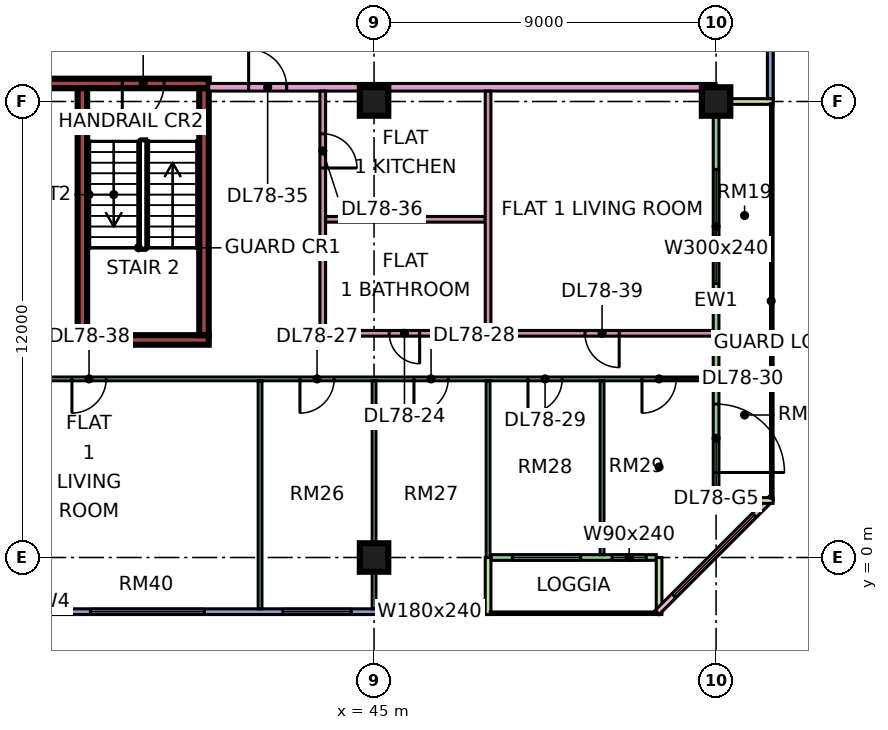
"""IFC4 building model, lengths in metres.
Left out: names, types, materials, properties, quantities, classifications, styles, units other than length and angle.
Written with IfcOpenShell. Run it as: python <this file> out.ifc"""

import sys

from ifc_helpers import new_model, si_unit, direction, frame, frame_2d, origin, origin_2d, place, context, subcontext, project, spatial, rectangle, extrude, element, fill, save


model = new_model("IFC4")
c1 = context("Model", 3, precision=1e-05, world=origin(), true_north=direction((0.0, 1.0)))
c2 = subcontext(c1, "Body", "Model", "MODEL_VIEW")
j1 = project(units=[si_unit("LENGTHUNIT", "METRE"), si_unit("PLANEANGLEUNIT", "RADIAN")], contexts=[c1])
p1 = place(None, origin())
s1 = spatial("IfcSite", under=j1, at=p1, CompositionType="ELEMENT")
p2 = place(p1, origin())
s2 = spatial("IfcBuilding", under=s1, at=p2, CompositionType="ELEMENT")
p3 = place(p2, frame((0.0, 0.0, 338.9)))
s3 = spatial("IfcBuildingStorey", under=s2, at=p3, CompositionType="ELEMENT", Elevation=338.9)
for number, where, z_axis, x_axis in (
    (1, (45.0, 0.0, 0.0), (0.0, 0.0, 1.0), (1.0, 0.0, 0.0)),
    (2, (45.0, 12.0, 0.0), (0.0, 0.0, 1.0), (1.0, 0.0, 0.0)),
    (3, (54.0, 12.0, 0.0), (0.0, 0.0, 1.0), (1.0, 0.0, 0.0)),
):
    element("IfcColumn", number, at=place(p3, frame(where, z_axis=z_axis, x_axis=x_axis)), inside=s3, PredefinedType="COLUMN", context=c2, shape_type="SweptSolid", body=[
        extrude(rectangle(XDim=0.75, YDim=0.75, at=origin_2d()), origin(), (0.0, 0.0, 1.0), 3.75),
    ])
p4 = place(p3, frame((37.2, 5.725, 0.0), z_axis=(0.0, 0.0, 1.0), x_axis=(1.0, 0.0, 0.0)))
e4 = element("IfcWall", 4, at=p4, inside=s3, PredefinedType="SHEAR", context=c2, shape_type="SweptSolid", body=[
    extrude(rectangle(XDim=3.45, YDim=0.25, at=frame_2d((1.725, 0.0))), origin(), (0.0, 0.0, 1.0), 3.75),
])
p5 = place(p3, frame((36.375, 12.475, 0.0), z_axis=(0.0, 0.0, 1.0), x_axis=(1.0, 0.0, 0.0)))
e5 = element("IfcWall", 5, at=p5, inside=s3, PredefinedType="SHEAR", context=c2, shape_type="SweptSolid", body=[
    extrude(rectangle(XDim=4.275, YDim=0.25, at=frame_2d((2.137, 0.0))), origin(), (0.0, 0.0, 1.0), 3.75),
])
p6 = place(p5, frame((2.0, 0.0, 0.0)))
e6 = element("IfcOpeningElement", 6, at=p6, cuts=e5, PredefinedType="OPENING", context=c2, shape_type="SweptSolid", body=[
    extrude(rectangle(XDim=1.1, YDim=2.2, at=frame_2d((0.55, 1.1))), frame((0.0, 0.135, 0.0), z_axis=(0.0, -1.0, 0.0), x_axis=(1.0, 0.0, 0.0)), (0.0, 0.0, 1.0), 0.27),
])
for number, where, z_axis, x_axis in (
    (7, (37.325, 5.85, 0.0), (0.0, 0.0, 1.0), (0.0, 1.0, 0.0)),
    (8, (40.525, 5.85, 0.0), (0.0, 0.0, 1.0), (0.0, 1.0, 0.0)),
):
    element("IfcWall", number, at=place(p3, frame(where, z_axis=z_axis, x_axis=x_axis)), inside=s3, PredefinedType="SHEAR", context=c2, shape_type="SweptSolid", body=[
        extrude(rectangle(XDim=6.5, YDim=0.25, at=frame_2d((3.25, 0.0))), origin(), (0.0, 0.0, 1.0), 3.75),
    ])
p7 = place(p3, frame((36.075, -1.425, 0.0), z_axis=(0.0, 0.0, 1.0), x_axis=(1.0, 0.0, 0.0)))
e9 = element("IfcWall", 9, at=p7, inside=s3, PredefinedType="SOLIDWALL", context=c2, shape_type="SweptSolid", body=[
    extrude(rectangle(XDim=11.85, YDim=0.15, at=frame_2d((5.925, 0.0))), origin(), (0.0, 0.0, 1.0), 3.35),
])
p8 = place(p7, frame((1.462, 0.0, 0.45)))
e10 = element("IfcOpeningElement", 10, at=p8, cuts=e9, PredefinedType="OPENING", context=c2, shape_type="SweptSolid", body=[
    extrude(rectangle(XDim=3.0, YDim=2.4, at=frame_2d((1.5, 1.2))), frame((0.0, 0.085, 0.0), z_axis=(0.0, -1.0, 0.0), x_axis=(1.0, 0.0, 0.0)), (0.0, 0.0, 1.0), 0.17),
])
p9 = place(p7, frame((6.525, 0.0, 0.45)))
e11 = element("IfcOpeningElement", 11, at=p9, cuts=e9, PredefinedType="OPENING", context=c2, shape_type="SweptSolid", body=[
    extrude(rectangle(XDim=1.8, YDim=2.4, at=frame_2d((0.9, 1.2))), frame((0.0, 0.085, 0.0), z_axis=(0.0, -1.0, 0.0), x_axis=(1.0, 0.0, 0.0)), (0.0, 0.0, 1.0), 0.17),
])
p10 = place(p7, frame((9.488, 0.0, 0.45)))
e12 = element("IfcOpeningElement", 12, at=p10, cuts=e9, PredefinedType="OPENING", context=c2, shape_type="SweptSolid", body=[
    extrude(rectangle(XDim=1.8, YDim=2.4, at=frame_2d((0.9, 1.2))), frame((0.0, 0.085, 0.0), z_axis=(0.0, -1.0, 0.0), x_axis=(1.0, 0.0, 0.0)), (0.0, 0.0, 1.0), 0.17),
])
p11 = place(p3, frame((48.075, 0.0, 0.0), z_axis=(0.0, 0.0, 1.0), x_axis=(1.0, 0.0, 0.0)))
e13 = element("IfcWall", 13, at=p11, inside=s3, PredefinedType="SOLIDWALL", context=c2, shape_type="SweptSolid", body=[
    extrude(rectangle(XDim=4.35, YDim=0.15, at=frame_2d((2.175, 0.0))), origin(), (0.0, 0.0, 1.0), 3.35),
])
p12 = place(p11, frame((0.562, 0.0, 0.45)))
e14 = element("IfcOpeningElement", 14, at=p12, cuts=e13, PredefinedType="OPENING", context=c2, shape_type="SweptSolid", body=[
    extrude(rectangle(XDim=1.8, YDim=2.4, at=frame_2d((0.9, 1.2))), frame((0.0, 0.085, 0.0), z_axis=(0.0, -1.0, 0.0), x_axis=(1.0, 0.0, 0.0)), (0.0, 0.0, 1.0), 0.17),
])
p13 = place(p11, frame((3.188, 0.0, 0.45)))
e15 = element("IfcOpeningElement", 15, at=p13, cuts=e13, PredefinedType="OPENING", context=c2, shape_type="SweptSolid", body=[
    extrude(rectangle(XDim=0.9, YDim=2.4, at=frame_2d((0.45, 1.2))), frame((0.0, 0.085, 0.0), z_axis=(0.0, -1.0, 0.0), x_axis=(1.0, 0.0, 0.0)), (0.0, 0.0, 1.0), 0.17),
])
for number, where, z_axis, x_axis in (
    (16, (48.0, -1.5, 0.0), (0.0, 0.0, 1.0), (0.0, 1.0, 0.0)),
    (17, (52.5, -1.5, 0.0), (0.0, 0.0, 1.0), (0.0, 1.0, 0.0)),
):
    element("IfcWall", number, at=place(p3, frame(where, z_axis=z_axis, x_axis=x_axis)), inside=s3, PredefinedType="SOLIDWALL", context=c2, shape_type="SweptSolid", body=[
        extrude(rectangle(XDim=1.5, YDim=0.15, at=frame_2d((0.75, 0.0))), origin(), (0.0, 0.0, 1.0), 3.35),
    ])
p14 = place(p3, frame((52.447, -1.447, 0.0), z_axis=(0.0, 0.0, 1.0), x_axis=(0.707106781187, 0.707106781187, 0.0)))
e18 = element("IfcWall", 18, at=p14, inside=s3, PredefinedType="SOLIDWALL", context=c2, shape_type="SweptSolid", body=[
    extrude(rectangle(XDim=4.243, YDim=0.15, at=frame_2d((2.121, 0.0))), origin(), (0.0, 0.0, 1.0), 3.35),
])
p15 = place(p14, frame((0.621, 0.0, 0.45)))
e19 = element("IfcOpeningElement", 19, at=p15, cuts=e18, PredefinedType="OPENING", context=c2, shape_type="SweptSolid", body=[
    extrude(rectangle(XDim=3.0, YDim=2.4, at=frame_2d((1.5, 1.2))), frame((0.0, 0.085, 0.0), z_axis=(0.0, -1.0, 0.0), x_axis=(1.0, 0.0, 0.0)), (0.0, 0.0, 1.0), 0.17),
])
p16 = place(p3, frame((54.0, 1.575, 0.0), z_axis=(0.0, 0.0, 1.0), x_axis=(0.0, 1.0, 0.0)))
e20 = element("IfcWall", 20, at=p16, inside=s3, PredefinedType="SOLIDWALL", context=c2, shape_type="SweptSolid", body=[
    extrude(rectangle(XDim=10.35, YDim=0.15, at=frame_2d((5.175, 0.0))), origin(), (0.0, 0.0, 1.0), 3.35),
])
p17 = place(p16, frame((0.663, 0.0, 0.0)))
e21 = element("IfcOpeningElement", 21, at=p17, cuts=e20, PredefinedType="OPENING", context=c2, shape_type="SweptSolid", body=[
    extrude(rectangle(XDim=1.8, YDim=2.4, at=frame_2d((0.9, 1.2))), frame((0.0, 0.085, 0.0), z_axis=(0.0, -1.0, 0.0), x_axis=(1.0, 0.0, 0.0)), (0.0, 0.0, 1.0), 0.17),
])
p18 = place(p16, frame((5.637, 0.0, 0.45)))
e22 = element("IfcOpeningElement", 22, at=p18, cuts=e20, PredefinedType="OPENING", context=c2, shape_type="SweptSolid", body=[
    extrude(rectangle(XDim=3.0, YDim=2.4, at=frame_2d((1.5, 1.2))), frame((0.0, 0.085, 0.0), z_axis=(0.0, -1.0, 0.0), x_axis=(1.0, 0.0, 0.0)), (0.0, 0.0, 1.0), 0.17),
])
for number, where, z_axis, x_axis in (
    (23, (55.5, 1.5, 0.0), (0.0, 0.0, 1.0), (-1.0, 0.0, 0.0)),
    (24, (55.5, 12.0, 0.0), (0.0, 0.0, 1.0), (-1.0, 0.0, 0.0)),
):
    element("IfcWall", number, at=place(p3, frame(where, z_axis=z_axis, x_axis=x_axis)), inside=s3, PredefinedType="SOLIDWALL", context=c2, shape_type="SweptSolid", body=[
        extrude(rectangle(XDim=1.5, YDim=0.15, at=frame_2d((0.75, 0.0))), origin(), (0.0, 0.0, 1.0), 3.35),
    ])
p19 = place(p3, frame((55.425, 12.075, 0.0), z_axis=(0.0, 0.0, 1.0), x_axis=(0.0, 1.0, 0.0)))
e25 = element("IfcWall", 25, at=p19, inside=s3, PredefinedType="SOLIDWALL", context=c2, shape_type="SweptSolid", body=[
    extrude(rectangle(XDim=10.425, YDim=0.15, at=frame_2d((5.212, 0.0))), origin(), (0.0, 0.0, 1.0), 3.35),
])
p20 = place(p19, frame((4.575, 0.0, 0.45)))
e26 = element("IfcOpeningElement", 26, at=p20, cuts=e25, PredefinedType="OPENING", context=c2, shape_type="SweptSolid", body=[
    extrude(rectangle(XDim=4.8, YDim=2.4, at=frame_2d((2.4, 1.2))), frame((0.0, 0.085, 0.0), z_axis=(0.0, -1.0, 0.0), x_axis=(1.0, 0.0, 0.0)), (0.0, 0.0, 1.0), 0.17),
])
p21 = place(p3, frame((33.05, 4.7, 0.0), z_axis=(0.0, 0.0, 1.0), x_axis=(1.0, 0.0, 0.0)))
e27 = element("IfcWall", 27, at=p21, inside=s3, PredefinedType="PARTITIONING", context=c2, shape_type="SweptSolid", body=[
    extrude(rectangle(XDim=20.876, YDim=0.1, at=frame_2d((10.438, 0.0))), origin(), (0.0, 0.0, 1.0), 3.35),
])
p22 = place(p21, frame((10.0, 0.0, 0.0)))
e28 = element("IfcOpeningElement", 28, at=p22, cuts=e27, PredefinedType="OPENING", context=c2, shape_type="SweptSolid", body=[
    extrude(rectangle(XDim=0.9, YDim=2.1, at=frame_2d((0.45, 1.05))), frame((0.0, 0.06, 0.0), z_axis=(0.0, -1.0, 0.0), x_axis=(1.0, 0.0, 0.0)), (0.0, 0.0, 1.0), 0.12),
])
p23 = place(p21, frame((13.0, 0.0, 0.0)))
e29 = element("IfcOpeningElement", 29, at=p23, cuts=e27, PredefinedType="OPENING", context=c2, shape_type="SweptSolid", body=[
    extrude(rectangle(XDim=0.9, YDim=2.1, at=frame_2d((0.45, 1.05))), frame((0.0, 0.06, 0.0), z_axis=(0.0, -1.0, 0.0), x_axis=(1.0, 0.0, 0.0)), (0.0, 0.0, 1.0), 0.12),
])
p24 = place(p21, frame((16.0, 0.0, 0.0)))
e30 = element("IfcOpeningElement", 30, at=p24, cuts=e27, PredefinedType="OPENING", context=c2, shape_type="SweptSolid", body=[
    extrude(rectangle(XDim=0.9, YDim=2.1, at=frame_2d((0.45, 1.05))), frame((0.0, 0.06, 0.0), z_axis=(0.0, -1.0, 0.0), x_axis=(1.0, 0.0, 0.0)), (0.0, 0.0, 1.0), 0.12),
])
p25 = place(p21, frame((19.0, 0.0, 0.0)))
e31 = element("IfcOpeningElement", 31, at=p25, cuts=e27, PredefinedType="OPENING", context=c2, shape_type="SweptSolid", body=[
    extrude(rectangle(XDim=0.9, YDim=2.1, at=frame_2d((0.45, 1.05))), frame((0.0, 0.06, 0.0), z_axis=(0.0, -1.0, 0.0), x_axis=(1.0, 0.0, 0.0)), (0.0, 0.0, 1.0), 0.12),
])
p26 = place(p21, frame((4.0, 0.0, 0.0)))
e32 = element("IfcOpeningElement", 32, at=p26, cuts=e27, PredefinedType="OPENING", context=c2, shape_type="SweptSolid", body=[
    extrude(rectangle(XDim=0.9, YDim=2.1, at=frame_2d((0.45, 1.05))), frame((0.0, 0.06, 0.0), z_axis=(0.0, -1.0, 0.0), x_axis=(1.0, 0.0, 0.0)), (0.0, 0.0, 1.0), 0.12),
])
p27 = place(p3, frame((40.65, 12.375, 0.0), z_axis=(0.0, 0.0, 1.0), x_axis=(1.0, 0.0, 0.0)))
e33 = element("IfcWall", 33, at=p27, inside=s3, PredefinedType="PARTITIONING", context=c2, shape_type="SweptSolid", body=[
    extrude(rectangle(XDim=13.35, YDim=0.2, at=frame_2d((6.675, 0.0))), origin(), (0.0, 0.0, 1.0), 3.35),
])
p28 = place(p27, frame((1.05, 0.0, 0.0)))
e34 = element("IfcOpeningElement", 34, at=p28, cuts=e33, PredefinedType="OPENING", context=c2, shape_type="SweptSolid", body=[
    extrude(rectangle(XDim=1.0, YDim=2.1, at=frame_2d((0.5, 1.05))), frame((0.0, 0.11, 0.0), z_axis=(0.0, -1.0, 0.0), x_axis=(1.0, 0.0, 0.0)), (0.0, 0.0, 1.0), 0.22),
])
p29 = place(p3, frame((42.0, -1.35, 0.0), z_axis=(0.0, 0.0, 1.0), x_axis=(0.0, 1.0, 0.0)))
e35 = element("IfcWall", 35, at=p29, inside=s3, PredefinedType="PARTITIONING", context=c2, shape_type="SweptSolid", body=[
    extrude(rectangle(XDim=6.0, YDim=0.1, at=frame_2d((3.0, 0.0))), origin(), (0.0, 0.0, 1.0), 3.35),
])
p30 = place(p3, frame((43.575, 5.9, 0.0), z_axis=(0.0, 0.0, 1.0), x_axis=(1.0, 0.0, 0.0)))
e36 = element("IfcWall", 36, at=p30, inside=s3, PredefinedType="PARTITIONING", context=c2, shape_type="SweptSolid", body=[
    extrude(rectangle(XDim=10.351, YDim=0.15, at=frame_2d((5.176, 0.0))), origin(), (0.0, 0.0, 1.0), 3.35),
])
p31 = place(p30, frame((1.825, 0.0, 0.0)))
e37 = element("IfcOpeningElement", 37, at=p31, cuts=e36, PredefinedType="OPENING", context=c2, shape_type="SweptSolid", body=[
    extrude(rectangle(XDim=0.8, YDim=2.1, at=frame_2d((0.4, 1.05))), frame((0.0, 0.085, 0.0), z_axis=(0.0, -1.0, 0.0), x_axis=(1.0, 0.0, 0.0)), (0.0, 0.0, 1.0), 0.17),
])
p32 = place(p30, frame((6.975, 0.0, 0.0)))
e38 = element("IfcOpeningElement", 38, at=p32, cuts=e36, PredefinedType="OPENING", context=c2, shape_type="SweptSolid", body=[
    extrude(rectangle(XDim=0.9, YDim=2.1, at=frame_2d((0.45, 1.05))), frame((0.0, 0.085, 0.0), z_axis=(0.0, -1.0, 0.0), x_axis=(1.0, 0.0, 0.0)), (0.0, 0.0, 1.0), 0.17),
])
p33 = place(p3, frame((43.65, 5.975, 0.0), z_axis=(0.0, 0.0, 1.0), x_axis=(0.0, 1.0, 0.0)))
e39 = element("IfcWall", 39, at=p33, inside=s3, PredefinedType="PARTITIONING", context=c2, shape_type="SweptSolid", body=[
    extrude(rectangle(XDim=6.3, YDim=0.15, at=frame_2d((3.15, 0.0))), origin(), (0.0, 0.0, 1.0), 3.35),
])
p34 = place(p33, frame((4.275, 0.0, 0.0)))
e40 = element("IfcOpeningElement", 40, at=p34, cuts=e39, PredefinedType="OPENING", context=c2, shape_type="SweptSolid", body=[
    extrude(rectangle(XDim=0.9, YDim=2.1, at=frame_2d((0.45, 1.05))), frame((0.0, 0.085, 0.0), z_axis=(0.0, -1.0, 0.0), x_axis=(1.0, 0.0, 0.0)), (0.0, 0.0, 1.0), 0.17),
])
p35 = place(p3, frame((43.725, 8.9, 0.0), z_axis=(0.0, 0.0, 1.0), x_axis=(1.0, 0.0, 0.0)))
e41 = element("IfcWall", 41, at=p35, inside=s3, PredefinedType="PARTITIONING", context=c2, shape_type="SweptSolid", body=[
    extrude(rectangle(XDim=4.2, YDim=0.15, at=frame_2d((2.1, 0.0))), origin(), (0.0, 0.0, 1.0), 3.35),
])
p36 = place(p3, frame((45.0, -1.351, 0.0), z_axis=(0.0, 0.0, 1.0), x_axis=(0.0, 1.0, 0.0)))
e42 = element("IfcWall", 42, at=p36, inside=s3, PredefinedType="PARTITIONING", context=c2, shape_type="SweptSolid", body=[
    extrude(rectangle(XDim=6.001, YDim=0.1, at=frame_2d((3.0, 0.0))), origin(), (0.0, 0.0, 1.0), 3.35),
])
p37 = place(p3, frame((48.0, 0.0, 0.0), z_axis=(0.0, 0.0, 1.0), x_axis=(0.0, 1.0, 0.0)))
e43 = element("IfcWall", 43, at=p37, inside=s3, PredefinedType="PARTITIONING", context=c2, shape_type="SweptSolid", body=[
    extrude(rectangle(XDim=4.65, YDim=0.1, at=frame_2d((2.325, 0.0))), origin(), (0.0, 0.0, 1.0), 3.35),
])
p38 = place(p3, frame((48.0, 5.975, 0.0), z_axis=(0.0, 0.0, 1.0), x_axis=(0.0, 1.0, 0.0)))
e44 = element("IfcWall", 44, at=p38, inside=s3, PredefinedType="PARTITIONING", context=c2, shape_type="SweptSolid", body=[
    extrude(rectangle(XDim=6.3, YDim=0.15, at=frame_2d((3.15, 0.0))), origin(), (0.0, 0.0, 1.0), 3.35),
])
p39 = place(p3, frame((51.0, 0.074, 0.0), z_axis=(0.0, 0.0, 1.0), x_axis=(0.0, 1.0, 0.0)))
e45 = element("IfcWall", 45, at=p39, inside=s3, PredefinedType="PARTITIONING", context=c2, shape_type="SweptSolid", body=[
    extrude(rectangle(XDim=4.576, YDim=0.1, at=frame_2d((2.288, 0.0))), origin(), (0.0, 0.0, 1.0), 3.35),
])
p40 = place(p8, origin())
e46 = element("IfcWindow", 46, at=p40, inside=s3, PartitioningType="SINGLE_PANEL", PredefinedType="WINDOW", context=c2, shape_type="SweptSolid", body=[
    extrude(rectangle(XDim=3.0, YDim=2.4, at=frame_2d((1.5, 1.2))), frame((0.0, 0.03, 0.0), z_axis=(0.0, -1.0, 0.0), x_axis=(1.0, 0.0, 0.0)), (0.0, 0.0, 1.0), 0.06),
])
fill(e10, e46)
p41 = place(p9, origin())
e47 = element("IfcWindow", 47, at=p41, inside=s3, PartitioningType="SINGLE_PANEL", PredefinedType="WINDOW", context=c2, shape_type="SweptSolid", body=[
    extrude(rectangle(XDim=1.8, YDim=2.4, at=frame_2d((0.9, 1.2))), frame((0.0, 0.03, 0.0), z_axis=(0.0, -1.0, 0.0), x_axis=(1.0, 0.0, 0.0)), (0.0, 0.0, 1.0), 0.06),
])
fill(e11, e47)
p42 = place(p10, origin())
e48 = element("IfcWindow", 48, at=p42, inside=s3, PartitioningType="SINGLE_PANEL", PredefinedType="WINDOW", context=c2, shape_type="SweptSolid", body=[
    extrude(rectangle(XDim=1.8, YDim=2.4, at=frame_2d((0.9, 1.2))), frame((0.0, 0.03, 0.0), z_axis=(0.0, -1.0, 0.0), x_axis=(1.0, 0.0, 0.0)), (0.0, 0.0, 1.0), 0.06),
])
fill(e12, e48)
p43 = place(p12, origin())
e49 = element("IfcWindow", 49, at=p43, inside=s3, PartitioningType="SINGLE_PANEL", PredefinedType="WINDOW", context=c2, shape_type="SweptSolid", body=[
    extrude(rectangle(XDim=1.8, YDim=2.4, at=frame_2d((0.9, 1.2))), frame((0.0, 0.03, 0.0), z_axis=(0.0, -1.0, 0.0), x_axis=(1.0, 0.0, 0.0)), (0.0, 0.0, 1.0), 0.06),
])
fill(e14, e49)
p44 = place(p13, origin())
e50 = element("IfcWindow", 50, at=p44, inside=s3, PartitioningType="SINGLE_PANEL", PredefinedType="WINDOW", context=c2, shape_type="SweptSolid", body=[
    extrude(rectangle(XDim=0.9, YDim=2.4, at=frame_2d((0.45, 1.2))), frame((0.0, 0.03, 0.0), z_axis=(0.0, -1.0, 0.0), x_axis=(1.0, 0.0, 0.0)), (0.0, 0.0, 1.0), 0.06),
])
fill(e15, e50)
p45 = place(p15, origin())
e51 = element("IfcWindow", 51, at=p45, inside=s3, PartitioningType="SINGLE_PANEL", PredefinedType="WINDOW", context=c2, shape_type="SweptSolid", body=[
    extrude(rectangle(XDim=3.0, YDim=2.4, at=frame_2d((1.5, 1.2))), frame((0.0, 0.03, 0.0), z_axis=(0.0, -1.0, 0.0), x_axis=(1.0, 0.0, 0.0)), (0.0, 0.0, 1.0), 0.06),
])
fill(e19, e51)
p46 = place(p17, frame((1.8, 0.0, 0.0), z_axis=(0.0, 0.0, 1.0), x_axis=(-1.0, 0.0, 0.0)))
e52 = element("IfcDoor", 52, at=p46, inside=s3, OperationType="DOUBLE_DOOR_SINGLE_SWING", PredefinedType="DOOR", context=c2, shape_type="SweptSolid", body=[
    extrude(rectangle(XDim=1.8, YDim=2.4, at=frame_2d((0.9, 1.2))), frame((0.0, 0.025, 0.0), z_axis=(0.0, -1.0, 0.0), x_axis=(1.0, 0.0, 0.0)), (0.0, 0.0, 1.0), 0.05),
])
fill(e21, e52)
p47 = place(p18, origin())
e53 = element("IfcWindow", 53, at=p47, inside=s3, PartitioningType="SINGLE_PANEL", PredefinedType="WINDOW", context=c2, shape_type="SweptSolid", body=[
    extrude(rectangle(XDim=3.0, YDim=2.4, at=frame_2d((1.5, 1.2))), frame((0.0, 0.03, 0.0), z_axis=(0.0, -1.0, 0.0), x_axis=(1.0, 0.0, 0.0)), (0.0, 0.0, 1.0), 0.06),
])
fill(e22, e53)
p48 = place(p6, frame((1.1, 0.0, 0.0), z_axis=(0.0, 0.0, 1.0), x_axis=(-1.0, 0.0, 0.0)))
e54 = element("IfcDoor", 54, at=p48, inside=s3, OperationType="SINGLE_SWING_LEFT", PredefinedType="DOOR", context=c2, shape_type="SweptSolid", body=[
    extrude(rectangle(XDim=1.1, YDim=2.2, at=frame_2d((0.55, 1.1))), frame((0.0, 0.025, 0.0), z_axis=(0.0, -1.0, 0.0), x_axis=(1.0, 0.0, 0.0)), (0.0, 0.0, 1.0), 0.05),
])
fill(e6, e54)
p49 = place(p31, origin())
e55 = element("IfcDoor", 55, at=p49, inside=s3, OperationType="SINGLE_SWING_RIGHT", PredefinedType="DOOR", context=c2, shape_type="SweptSolid", body=[
    extrude(rectangle(XDim=0.8, YDim=2.1, at=frame_2d((0.4, 1.05))), frame((0.0, 0.025, 0.0), z_axis=(0.0, -1.0, 0.0), x_axis=(1.0, 0.0, 0.0)), (0.0, 0.0, 1.0), 0.05),
])
fill(e37, e55)
p50 = place(p22, frame((0.9, 0.0, 0.0), z_axis=(0.0, 0.0, 1.0), x_axis=(-1.0, 0.0, 0.0)))
e56 = element("IfcDoor", 56, at=p50, inside=s3, OperationType="SINGLE_SWING_LEFT", PredefinedType="DOOR", context=c2, shape_type="SweptSolid", body=[
    extrude(rectangle(XDim=0.9, YDim=2.1, at=frame_2d((0.45, 1.05))), frame((0.0, 0.025, 0.0), z_axis=(0.0, -1.0, 0.0), x_axis=(1.0, 0.0, 0.0)), (0.0, 0.0, 1.0), 0.05),
])
fill(e28, e56)
p51 = place(p23, frame((0.9, 0.0, 0.0), z_axis=(0.0, 0.0, 1.0), x_axis=(-1.0, 0.0, 0.0)))
e57 = element("IfcDoor", 57, at=p51, inside=s3, OperationType="SINGLE_SWING_LEFT", PredefinedType="DOOR", context=c2, shape_type="SweptSolid", body=[
    extrude(rectangle(XDim=0.9, YDim=2.1, at=frame_2d((0.45, 1.05))), frame((0.0, 0.025, 0.0), z_axis=(0.0, -1.0, 0.0), x_axis=(1.0, 0.0, 0.0)), (0.0, 0.0, 1.0), 0.05),
])
fill(e29, e57)
p52 = place(p24, frame((0.9, 0.0, 0.0), z_axis=(0.0, 0.0, 1.0), x_axis=(-1.0, 0.0, 0.0)))
e58 = element("IfcDoor", 58, at=p52, inside=s3, OperationType="SINGLE_SWING_LEFT", PredefinedType="DOOR", context=c2, shape_type="SweptSolid", body=[
    extrude(rectangle(XDim=0.9, YDim=2.1, at=frame_2d((0.45, 1.05))), frame((0.0, 0.025, 0.0), z_axis=(0.0, -1.0, 0.0), x_axis=(1.0, 0.0, 0.0)), (0.0, 0.0, 1.0), 0.05),
])
fill(e30, e58)
p53 = place(p25, frame((0.9, 0.0, 0.0), z_axis=(0.0, 0.0, 1.0), x_axis=(-1.0, 0.0, 0.0)))
e59 = element("IfcDoor", 59, at=p53, inside=s3, OperationType="SINGLE_SWING_LEFT", PredefinedType="DOOR", context=c2, shape_type="SweptSolid", body=[
    extrude(rectangle(XDim=0.9, YDim=2.1, at=frame_2d((0.45, 1.05))), frame((0.0, 0.025, 0.0), z_axis=(0.0, -1.0, 0.0), x_axis=(1.0, 0.0, 0.0)), (0.0, 0.0, 1.0), 0.05),
])
fill(e31, e59)
p54 = place(p28, origin())
e60 = element("IfcDoor", 60, at=p54, inside=s3, OperationType="SINGLE_SWING_LEFT", PredefinedType="DOOR", context=c2, shape_type="SweptSolid", body=[
    extrude(rectangle(XDim=1.0, YDim=2.1, at=frame_2d((0.5, 1.05))), frame((0.0, 0.025, 0.0), z_axis=(0.0, -1.0, 0.0), x_axis=(1.0, 0.0, 0.0)), (0.0, 0.0, 1.0), 0.05),
])
fill(e34, e60)
p55 = place(p34, frame((0.9, 0.0, 0.0), z_axis=(0.0, 0.0, 1.0), x_axis=(-1.0, 0.0, 0.0)))
e61 = element("IfcDoor", 61, at=p55, inside=s3, OperationType="SINGLE_SWING_LEFT", PredefinedType="DOOR", context=c2, shape_type="SweptSolid", body=[
    extrude(rectangle(XDim=0.9, YDim=2.1, at=frame_2d((0.45, 1.05))), frame((0.0, 0.025, 0.0), z_axis=(0.0, -1.0, 0.0), x_axis=(1.0, 0.0, 0.0)), (0.0, 0.0, 1.0), 0.05),
])
fill(e40, e61)
p56 = place(p26, frame((0.9, 0.0, 0.0), z_axis=(0.0, 0.0, 1.0), x_axis=(-1.0, 0.0, 0.0)))
e62 = element("IfcDoor", 62, at=p56, inside=s3, OperationType="SINGLE_SWING_LEFT", PredefinedType="DOOR", context=c2, shape_type="SweptSolid", body=[
    extrude(rectangle(XDim=0.9, YDim=2.1, at=frame_2d((0.45, 1.05))), frame((0.0, 0.025, 0.0), z_axis=(0.0, -1.0, 0.0), x_axis=(1.0, 0.0, 0.0)), (0.0, 0.0, 1.0), 0.05),
])
fill(e32, e62)
p57 = place(p32, origin())
e63 = element("IfcDoor", 63, at=p57, inside=s3, OperationType="SINGLE_SWING_RIGHT", PredefinedType="DOOR", context=c2, shape_type="SweptSolid", body=[
    extrude(rectangle(XDim=0.9, YDim=2.1, at=frame_2d((0.45, 1.05))), frame((0.0, 0.025, 0.0), z_axis=(0.0, -1.0, 0.0), x_axis=(1.0, 0.0, 0.0)), (0.0, 0.0, 1.0), 0.05),
])
fill(e38, e63)
save(model, sys.argv[1])
